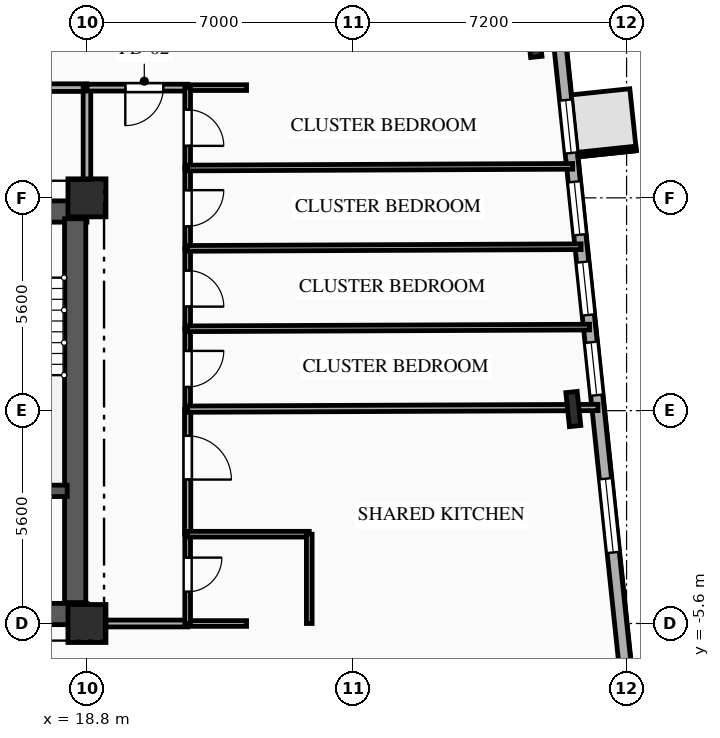
"""IFC4 building model, lengths in metres.
Left out: names, types, materials, properties, quantities, classifications, styles, units other than length and angle.
Written with IfcOpenShell. Run it as: python <this file> out.ifc"""

import sys

from ifc_helpers import new_model, si_unit, direction, frame, frame_2d, origin, origin_2d, place, context, subcontext, project, spatial, rectangle, i_section, extrude, element, fill, save


model = new_model("IFC4")
c1 = context("Model", 3, precision=1e-05, world=origin(), true_north=direction((0.0, 1.0)))
c2 = subcontext(c1, "Body", "Model", "MODEL_VIEW")
j1 = project(units=[si_unit("LENGTHUNIT", "METRE"), si_unit("PLANEANGLEUNIT", "RADIAN")], contexts=[c1])
p1 = place(None, origin())
s1 = spatial("IfcSite", under=j1, at=p1, CompositionType="ELEMENT")
p2 = place(p1, origin())
s2 = spatial("IfcBuilding", under=s1, at=p2, CompositionType="ELEMENT")
p3 = place(p2, frame((0.0, 0.0, 89.05)))
s3 = spatial("IfcBuildingStorey", under=s2, at=p3, CompositionType="ELEMENT", Elevation=89.05)
for number, where, z_axis, x_axis in (
    (1, (18.8, -5.6, 0.0), (0.0, 0.0, 1.0), (1.0, 0.0, 0.0)),
    (2, (18.8, 5.6, 0.0), (0.0, 0.0, 1.0), (1.0, 0.0, 0.0)),
):
    element("IfcColumn", number, at=place(p3, frame(where, z_axis=z_axis, x_axis=x_axis)), inside=s3, PredefinedType="COLUMN", context=c2, shape_type="SweptSolid", body=[
        extrude(rectangle(XDim=1.0, YDim=1.0, at=origin_2d()), origin(), (0.0, 0.0, 1.0), 3.35),
    ])
for number, where, z_axis, x_axis in (
    (3, (31.598, 0.043, 0.0), (0.0, 0.0, 1.0), (0.995, 0.105, 0.0)),
    (4, (30.577, 9.756, 0.0), (0.0, 0.0, 1.0), (0.995, 0.105, 0.0)),
):
    element("IfcColumn", number, at=place(p3, frame(where, z_axis=z_axis, x_axis=x_axis)), inside=s3, PredefinedType="COLUMN", context=c2, shape_type="SweptSolid", body=[
        extrude(i_section(OverallWidth=0.3, OverallDepth=0.9, WebThickness=0.019, FlangeThickness=0.035, FilletRadius=0.03, at=origin_2d()), origin(), (0.0, 0.0, 1.0), 3.35),
    ])
p4 = place(p3, frame((30.135, 20.183, 0.0), z_axis=(0.0, 0.0, 1.0), x_axis=(0.104525716865, -0.994522184023, 0.0)))
e5 = element("IfcWall", 5, at=p4, inside=s3, PredefinedType="SOLIDWALL", context=c2, shape_type="SweptSolid", body=[
    extrude(rectangle(XDim=30.6, YDim=0.32, at=frame_2d((15.3, 0.0))), origin(), (0.0, 0.0, 1.0), 3.045),
])
p5 = place(p4, frame((12.077, 0.0, 0.85)))
e6 = element("IfcOpeningElement", 6, at=p5, cuts=e5, PredefinedType="OPENING", context=c2, shape_type="SweptSolid", body=[
    extrude(rectangle(XDim=1.4, YDim=1.85, at=frame_2d((0.7, 0.925))), frame((0.0, 0.17, 0.0), z_axis=(0.0, -1.0, 0.0), x_axis=(1.0, 0.0, 0.0)), (0.0, 0.0, 1.0), 0.34),
])
p6 = place(p4, frame((14.24, 0.0, 0.85)))
e7 = element("IfcOpeningElement", 7, at=p6, cuts=e5, PredefinedType="OPENING", context=c2, shape_type="SweptSolid", body=[
    extrude(rectangle(XDim=1.4, YDim=1.85, at=frame_2d((0.7, 0.925))), frame((0.0, 0.17, 0.0), z_axis=(0.0, -1.0, 0.0), x_axis=(1.0, 0.0, 0.0)), (0.0, 0.0, 1.0), 0.34),
])
p7 = place(p4, frame((16.362, 0.0, 0.85)))
e8 = element("IfcOpeningElement", 8, at=p7, cuts=e5, PredefinedType="OPENING", context=c2, shape_type="SweptSolid", body=[
    extrude(rectangle(XDim=1.4, YDim=1.85, at=frame_2d((0.7, 0.925))), frame((0.0, 0.17, 0.0), z_axis=(0.0, -1.0, 0.0), x_axis=(1.0, 0.0, 0.0)), (0.0, 0.0, 1.0), 0.34),
])
p8 = place(p4, frame((18.485, 0.0, 0.85)))
e9 = element("IfcOpeningElement", 9, at=p8, cuts=e5, PredefinedType="OPENING", context=c2, shape_type="SweptSolid", body=[
    extrude(rectangle(XDim=1.4, YDim=1.85, at=frame_2d((0.7, 0.925))), frame((0.0, 0.17, 0.0), z_axis=(0.0, -1.0, 0.0), x_axis=(1.0, 0.0, 0.0)), (0.0, 0.0, 1.0), 0.34),
])
p9 = place(p4, frame((22.095, 0.0, 0.85)))
e10 = element("IfcOpeningElement", 10, at=p9, cuts=e5, PredefinedType="OPENING", context=c2, shape_type="SweptSolid", body=[
    extrude(rectangle(XDim=1.95, YDim=1.85, at=frame_2d((0.975, 0.925))), frame((0.0, 0.17, 0.0), z_axis=(0.0, -1.0, 0.0), x_axis=(1.0, 0.0, 0.0)), (0.0, 0.0, 1.0), 0.34),
])
p10 = place(p3, frame((9.2, 5.24, 0.0), z_axis=(0.0, 0.0, 1.0), x_axis=(1.0, 0.0, 0.0)))
e11 = element("IfcWall", 11, at=p10, inside=s3, PredefinedType="SHEAR", context=c2, shape_type="SweptSolid", body=[
    extrude(rectangle(XDim=9.6, YDim=0.56, at=frame_2d((4.8, 0.0))), origin(), (0.0, 0.0, 1.0), 3.045),
])
p11 = place(p10, frame((6.95, 0.0, 0.0)))
e12 = element("IfcOpeningElement", 12, at=p11, cuts=e11, PredefinedType="OPENING", context=c2, shape_type="SweptSolid", body=[
    extrude(rectangle(XDim=1.1, YDim=2.15, at=frame_2d((0.55, 1.075))), frame((0.0, 0.29, 0.0), z_axis=(0.0, -1.0, 0.0), x_axis=(1.0, 0.0, 0.0)), (0.0, 0.0, 1.0), 0.58),
])
p12 = place(p10, frame((3.775, 0.0, 0.0)))
e13 = element("IfcOpeningElement", 13, at=p12, cuts=e11, PredefinedType="OPENING", context=c2, shape_type="SweptSolid", body=[
    extrude(rectangle(XDim=1.05, YDim=2.1, at=frame_2d((0.525, 1.05))), frame((0.0, 0.29, 0.0), z_axis=(0.0, -1.0, 0.0), x_axis=(1.0, 0.0, 0.0)), (0.0, 0.0, 1.0), 0.58),
])
p13 = place(p3, frame((9.2, -5.35, 0.0), z_axis=(0.0, 0.0, 1.0), x_axis=(1.0, 0.0, 0.0)))
e14 = element("IfcWall", 14, at=p13, inside=s3, PredefinedType="SHEAR", context=c2, shape_type="SweptSolid", body=[
    extrude(rectangle(XDim=9.6, YDim=0.56, at=frame_2d((4.8, 0.0))), origin(), (0.0, 0.0, 1.0), 3.045),
])
p14 = place(p13, frame((7.65, 0.0, 0.0)))
e15 = element("IfcOpeningElement", 15, at=p14, cuts=e14, PredefinedType="OPENING", context=c2, shape_type="SweptSolid", body=[
    extrude(rectangle(XDim=0.9, YDim=2.1, at=frame_2d((0.45, 1.05))), frame((0.0, 0.29, 0.0), z_axis=(0.0, -1.0, 0.0), x_axis=(1.0, 0.0, 0.0)), (0.0, 0.0, 1.0), 0.58),
])
p15 = place(p3, frame((18.49, -5.05, 0.0), z_axis=(0.0, 0.0, 1.0), x_axis=(0.0, 1.0, 0.0)))
e16 = element("IfcWall", 16, at=p15, inside=s3, PredefinedType="SHEAR", context=c2, shape_type="SweptSolid", body=[
    extrude(rectangle(XDim=10.1, YDim=0.56, at=frame_2d((5.05, 0.0))), origin(), (0.0, 0.0, 1.0), 3.045),
])
p16 = place(p3, frame((15.1, -2.11, 0.0), z_axis=(0.0, 0.0, 1.0), x_axis=(1.0, 0.0, 0.0)))
e17 = element("IfcWall", 17, at=p16, inside=s3, PredefinedType="SHEAR", context=c2, shape_type="SweptSolid", body=[
    extrude(rectangle(XDim=3.18, YDim=0.3, at=frame_2d((1.59, 0.0))), origin(), (0.0, 0.0, 1.0), 3.045),
])
p17 = place(p3, frame((18.8, 8.5, 0.0), z_axis=(0.0, 0.0, 1.0), x_axis=(-1.0, 0.0, 0.0)))
e18 = element("IfcWall", 18, at=p17, inside=s3, PredefinedType="PARTITIONING", context=c2, shape_type="SweptSolid", body=[
    extrude(rectangle(XDim=6.8, YDim=0.2, at=frame_2d((3.4, 0.0))), origin(), (0.0, 0.0, 1.0), 3.045),
])
p18 = place(p17, frame((3.985, 0.0, 0.0)))
e19 = element("IfcOpeningElement", 19, at=p18, cuts=e18, PredefinedType="OPENING", context=c2, shape_type="SweptSolid", body=[
    extrude(rectangle(XDim=1.1, YDim=2.15, at=frame_2d((0.55, 1.075))), frame((0.0, 0.11, 0.0), z_axis=(0.0, -1.0, 0.0), x_axis=(1.0, 0.0, 0.0)), (0.0, 0.0, 1.0), 0.22),
])
p19 = place(p3, frame((18.8, 5.6, 0.0), z_axis=(0.0, 0.0, 1.0), x_axis=(0.0, 1.0, 0.0)))
e20 = element("IfcWall", 20, at=p19, inside=s3, PredefinedType="PARTITIONING", context=c2, shape_type="SweptSolid", body=[
    extrude(rectangle(XDim=2.9, YDim=0.2, at=frame_2d((1.45, 0.0))), origin(), (0.0, 0.0, 1.0), 2.53),
])
p20 = place(p3, frame((21.45, 8.5, 0.0), z_axis=(0.0, 0.0, 1.0), x_axis=(-1.0, 0.0, 0.0)))
e21 = element("IfcWall", 21, at=p20, inside=s3, PredefinedType="PARTITIONING", context=c2, shape_type="SweptSolid", body=[
    extrude(rectangle(XDim=2.65, YDim=0.18, at=frame_2d((1.325, 0.0))), origin(), (0.0, 0.0, 1.0), 3.045),
])
p21 = place(p20, frame((0.641, 0.0, 0.0)))
e22 = element("IfcOpeningElement", 22, at=p21, cuts=e21, PredefinedType="OPENING", context=c2, shape_type="SweptSolid", body=[
    extrude(rectangle(XDim=1.0, YDim=2.15, at=frame_2d((0.5, 1.075))), frame((0.0, 0.1, 0.0), z_axis=(0.0, -1.0, 0.0), x_axis=(1.0, 0.0, 0.0)), (0.0, 0.0, 1.0), 0.2),
])
p22 = place(p3, frame((23.0, 8.5, 0.0), z_axis=(0.0, 0.0, 1.0), x_axis=(-1.0, 0.0, 0.0)))
e23 = element("IfcWall", 23, at=p22, inside=s3, PredefinedType="PARTITIONING", context=c2, shape_type="SweptSolid", body=[
    extrude(rectangle(XDim=1.55, YDim=0.15, at=frame_2d((0.775, 0.0))), origin(), (0.0, 0.0, 1.0), 3.045),
])
p23 = place(p3, frame((18.8, -5.6, 0.0), z_axis=(0.0, 0.0, 1.0), x_axis=(1.0, 0.0, 0.0)))
e24 = element("IfcWall", 24, at=p23, inside=s3, PredefinedType="PARTITIONING", context=c2, shape_type="SweptSolid", body=[
    extrude(rectangle(XDim=2.65, YDim=0.18, at=frame_2d((1.325, 0.0))), origin(), (0.0, 0.0, 1.0), 2.53),
])
p24 = place(p3, frame((21.45, -5.6, 0.0), z_axis=(0.0, 0.0, 1.0), x_axis=(1.0, 0.0, 0.0)))
e25 = element("IfcWall", 25, at=p24, inside=s3, PredefinedType="PLUMBINGWALL", context=c2, shape_type="SweptSolid", body=[
    extrude(rectangle(XDim=1.55, YDim=0.15, at=frame_2d((0.775, 0.0))), origin(), (0.0, 0.0, 1.0), 3.045),
])
p25 = place(p3, frame((21.45, -3.25, 0.0), z_axis=(0.0, 0.0, 1.0), x_axis=(0.0, -1.0, 0.0)))
e26 = element("IfcWall", 26, at=p25, inside=s3, PredefinedType="PLUMBINGWALL", context=c2, shape_type="SweptSolid", body=[
    extrude(rectangle(XDim=2.35, YDim=0.15, at=frame_2d((1.175, 0.0))), origin(), (0.0, 0.0, 1.0), 3.045),
])
p26 = place(p25, frame((0.616, 0.0, 0.0)))
e27 = element("IfcOpeningElement", 27, at=p26, cuts=e26, PredefinedType="OPENING", context=c2, shape_type="SweptSolid", body=[
    extrude(rectangle(XDim=0.9, YDim=2.1, at=frame_2d((0.45, 1.05))), frame((0.0, 0.085, 0.0), z_axis=(0.0, -1.0, 0.0), x_axis=(1.0, 0.0, 0.0)), (0.0, 0.0, 1.0), 0.17),
])
p27 = place(p3, frame((21.45, 0.04, 0.0), z_axis=(0.0, 0.0, 1.0), x_axis=(0.0, -1.0, 0.0)))
e28 = element("IfcWall", 28, at=p27, inside=s3, PredefinedType="PARTITIONING", context=c2, shape_type="SweptSolid", body=[
    extrude(rectangle(XDim=3.29, YDim=0.165, at=frame_2d((1.645, 0.0))), origin(), (0.0, 0.0, 1.0), 3.045),
])
p28 = place(p27, frame((0.702, 0.0, 0.0)))
e29 = element("IfcOpeningElement", 29, at=p28, cuts=e28, PredefinedType="OPENING", context=c2, shape_type="SweptSolid", body=[
    extrude(rectangle(XDim=1.15, YDim=2.15, at=frame_2d((0.575, 1.075))), frame((0.0, 0.093, 0.0), z_axis=(0.0, -1.0, 0.0), x_axis=(1.0, 0.0, 0.0)), (0.0, 0.0, 1.0), 0.185),
])
p29 = place(p3, frame((21.45, 2.155, 0.0), z_axis=(0.0, 0.0, 1.0), x_axis=(0.0, -1.0, 0.0)))
e30 = element("IfcWall", 30, at=p29, inside=s3, PredefinedType="PARTITIONING", context=c2, shape_type="SweptSolid", body=[
    extrude(rectangle(XDim=2.115, YDim=0.15, at=frame_2d((1.058, 0.0))), origin(), (0.0, 0.0, 1.0), 3.045),
])
p30 = place(p29, frame((0.583, 0.0, 0.0)))
e31 = element("IfcOpeningElement", 31, at=p30, cuts=e30, PredefinedType="OPENING", context=c2, shape_type="SweptSolid", body=[
    extrude(rectangle(XDim=0.95, YDim=2.1, at=frame_2d((0.475, 1.05))), frame((0.0, 0.085, 0.0), z_axis=(0.0, -1.0, 0.0), x_axis=(1.0, 0.0, 0.0)), (0.0, 0.0, 1.0), 0.17),
])
p31 = place(p3, frame((21.45, 4.27, 0.0), z_axis=(0.0, 0.0, 1.0), x_axis=(0.0, -1.0, 0.0)))
e32 = element("IfcWall", 32, at=p31, inside=s3, PredefinedType="PARTITIONING", context=c2, shape_type="SweptSolid", body=[
    extrude(rectangle(XDim=2.115, YDim=0.15, at=frame_2d((1.058, 0.0))), origin(), (0.0, 0.0, 1.0), 3.045),
])
p32 = place(p31, frame((0.583, 0.0, 0.0)))
e33 = element("IfcOpeningElement", 33, at=p32, cuts=e32, PredefinedType="OPENING", context=c2, shape_type="SweptSolid", body=[
    extrude(rectangle(XDim=0.95, YDim=2.1, at=frame_2d((0.475, 1.05))), frame((0.0, 0.085, 0.0), z_axis=(0.0, -1.0, 0.0), x_axis=(1.0, 0.0, 0.0)), (0.0, 0.0, 1.0), 0.17),
])
p33 = place(p3, frame((21.45, 6.385, 0.0), z_axis=(0.0, 0.0, 1.0), x_axis=(0.0, -1.0, 0.0)))
e34 = element("IfcWall", 34, at=p33, inside=s3, PredefinedType="PARTITIONING", context=c2, shape_type="SweptSolid", body=[
    extrude(rectangle(XDim=2.115, YDim=0.15, at=frame_2d((1.058, 0.0))), origin(), (0.0, 0.0, 1.0), 3.045),
])
p34 = place(p33, frame((0.583, 0.0, 0.0)))
e35 = element("IfcOpeningElement", 35, at=p34, cuts=e34, PredefinedType="OPENING", context=c2, shape_type="SweptSolid", body=[
    extrude(rectangle(XDim=0.95, YDim=2.1, at=frame_2d((0.475, 1.05))), frame((0.0, 0.085, 0.0), z_axis=(0.0, -1.0, 0.0), x_axis=(1.0, 0.0, 0.0)), (0.0, 0.0, 1.0), 0.17),
])
p35 = place(p3, frame((21.45, 8.5, 0.0), z_axis=(0.0, 0.0, 1.0), x_axis=(0.0, -1.0, 0.0)))
e36 = element("IfcWall", 36, at=p35, inside=s3, PredefinedType="PARTITIONING", context=c2, shape_type="SweptSolid", body=[
    extrude(rectangle(XDim=2.115, YDim=0.15, at=frame_2d((1.058, 0.0))), origin(), (0.0, 0.0, 1.0), 3.045),
])
p36 = place(p35, frame((0.583, 0.0, 0.0)))
e37 = element("IfcOpeningElement", 37, at=p36, cuts=e36, PredefinedType="OPENING", context=c2, shape_type="SweptSolid", body=[
    extrude(rectangle(XDim=0.95, YDim=2.1, at=frame_2d((0.475, 1.05))), frame((0.0, 0.085, 0.0), z_axis=(0.0, -1.0, 0.0), x_axis=(1.0, 0.0, 0.0)), (0.0, 0.0, 1.0), 0.17),
])
p37 = place(p3, frame((21.45, -3.25, 0.0), z_axis=(0.0, 0.0, 1.0), x_axis=(1.0, 0.0, 0.0)))
e38 = element("IfcWall", 38, at=p37, inside=s3, PredefinedType="PLUMBINGWALL", context=c2, shape_type="SweptSolid", body=[
    extrude(rectangle(XDim=3.2, YDim=0.15, at=frame_2d((1.6, 0.0))), origin(), (0.0, 0.0, 1.0), 3.045),
])
p38 = place(p3, frame((24.65, -3.25, 0.0), z_axis=(0.0, 0.0, 1.0), x_axis=(0.0, -1.0, 0.0)))
e39 = element("IfcWall", 39, at=p38, inside=s3, PredefinedType="PLUMBINGWALL", context=c2, shape_type="SweptSolid", body=[
    extrude(rectangle(XDim=2.35, YDim=0.15, at=frame_2d((1.175, 0.0))), origin(), (0.0, 0.0, 1.0), 3.045),
])
p39 = place(p3, frame((21.45, 0.04, 0.0), z_axis=(0.0, 0.0, 1.0), x_axis=(0.999991717636, 0.004069970361, 0.0)))
e40 = element("IfcWall", 40, at=p39, inside=s3, PredefinedType="PARTITIONING", context=c2, shape_type="SweptSolid", body=[
    extrude(rectangle(XDim=10.797, YDim=0.165, at=frame_2d((5.399, 0.0))), origin(), (0.0, 0.0, 1.0), 2.53),
])
p40 = place(p3, frame((21.45, 2.155, 0.0), z_axis=(0.0, 0.0, 1.0), x_axis=(0.999991365588, 0.004155568413, 0.0)))
e41 = element("IfcWall", 41, at=p40, inside=s3, PredefinedType="PARTITIONING", context=c2, shape_type="SweptSolid", body=[
    extrude(rectangle(XDim=10.575, YDim=0.15, at=frame_2d((5.288, 0.0))), origin(), (0.0, 0.0, 1.0), 3.045),
])
p41 = place(p3, frame((21.45, 4.27, 0.0), z_axis=(0.0, 0.0, 1.0), x_axis=(0.999990991033, 0.004244744214, 0.0)))
e42 = element("IfcWall", 42, at=p41, inside=s3, PredefinedType="PARTITIONING", context=c2, shape_type="SweptSolid", body=[
    extrude(rectangle(XDim=10.353, YDim=0.15, at=frame_2d((5.176, 0.0))), origin(), (0.0, 0.0, 1.0), 3.045),
])
p42 = place(p3, frame((21.45, 6.385, 0.0), z_axis=(0.0, 0.0, 1.0), x_axis=(0.999990591112, 0.004337935759, 0.0)))
e43 = element("IfcWall", 43, at=p42, inside=s3, PredefinedType="PARTITIONING", context=c2, shape_type="SweptSolid", body=[
    extrude(rectangle(XDim=10.13, YDim=0.15, at=frame_2d((5.065, 0.0))), origin(), (0.0, 0.0, 1.0), 3.045),
])
p43 = place(p5, origin())
e44 = element("IfcWindow", 44, at=p43, inside=s3, PartitioningType="SINGLE_PANEL", PredefinedType="WINDOW", context=c2, shape_type="SweptSolid", body=[
    extrude(rectangle(XDim=1.4, YDim=1.85, at=frame_2d((0.7, 0.925))), frame((0.0, 0.03, 0.0), z_axis=(0.0, -1.0, 0.0), x_axis=(1.0, 0.0, 0.0)), (0.0, 0.0, 1.0), 0.06),
])
fill(e6, e44)
p44 = place(p6, origin())
e45 = element("IfcWindow", 45, at=p44, inside=s3, PartitioningType="SINGLE_PANEL", PredefinedType="WINDOW", context=c2, shape_type="SweptSolid", body=[
    extrude(rectangle(XDim=1.4, YDim=1.85, at=frame_2d((0.7, 0.925))), frame((0.0, 0.03, 0.0), z_axis=(0.0, -1.0, 0.0), x_axis=(1.0, 0.0, 0.0)), (0.0, 0.0, 1.0), 0.06),
])
fill(e7, e45)
p45 = place(p7, origin())
e46 = element("IfcWindow", 46, at=p45, inside=s3, PartitioningType="SINGLE_PANEL", PredefinedType="WINDOW", context=c2, shape_type="SweptSolid", body=[
    extrude(rectangle(XDim=1.4, YDim=1.85, at=frame_2d((0.7, 0.925))), frame((0.0, 0.03, 0.0), z_axis=(0.0, -1.0, 0.0), x_axis=(1.0, 0.0, 0.0)), (0.0, 0.0, 1.0), 0.06),
])
fill(e8, e46)
p46 = place(p8, origin())
e47 = element("IfcWindow", 47, at=p46, inside=s3, PartitioningType="SINGLE_PANEL", PredefinedType="WINDOW", context=c2, shape_type="SweptSolid", body=[
    extrude(rectangle(XDim=1.4, YDim=1.85, at=frame_2d((0.7, 0.925))), frame((0.0, 0.03, 0.0), z_axis=(0.0, -1.0, 0.0), x_axis=(1.0, 0.0, 0.0)), (0.0, 0.0, 1.0), 0.06),
])
fill(e9, e47)
p47 = place(p9, origin())
e48 = element("IfcWindow", 48, at=p47, inside=s3, PartitioningType="SINGLE_PANEL", PredefinedType="WINDOW", context=c2, shape_type="SweptSolid", body=[
    extrude(rectangle(XDim=1.95, YDim=1.85, at=frame_2d((0.975, 0.925))), frame((0.0, 0.03, 0.0), z_axis=(0.0, -1.0, 0.0), x_axis=(1.0, 0.0, 0.0)), (0.0, 0.0, 1.0), 0.06),
])
fill(e10, e48)
p48 = place(p21, origin())
e49 = element("IfcDoor", 49, at=p48, inside=s3, OperationType="SINGLE_SWING_RIGHT", PredefinedType="DOOR", context=c2, shape_type="SweptSolid", body=[
    extrude(rectangle(XDim=1.0, YDim=2.15, at=frame_2d((0.5, 1.075))), frame((0.0, 0.025, 0.0), z_axis=(0.0, -1.0, 0.0), x_axis=(1.0, 0.0, 0.0)), (0.0, 0.0, 1.0), 0.05),
])
fill(e22, e49)
p49 = place(p26, origin())
e50 = element("IfcDoor", 50, at=p49, inside=s3, OperationType="SINGLE_SWING_LEFT", PredefinedType="DOOR", context=c2, shape_type="SweptSolid", body=[
    extrude(rectangle(XDim=0.9, YDim=2.1, at=frame_2d((0.45, 1.05))), frame((0.0, 0.025, 0.0), z_axis=(0.0, -1.0, 0.0), x_axis=(1.0, 0.0, 0.0)), (0.0, 0.0, 1.0), 0.05),
])
fill(e27, e50)
p50 = place(p28, origin())
e51 = element("IfcDoor", 51, at=p50, inside=s3, OperationType="SINGLE_SWING_RIGHT", PredefinedType="DOOR", context=c2, shape_type="SweptSolid", body=[
    extrude(rectangle(XDim=1.15, YDim=2.15, at=frame_2d((0.575, 1.075))), frame((0.0, 0.025, 0.0), z_axis=(0.0, -1.0, 0.0), x_axis=(1.0, 0.0, 0.0)), (0.0, 0.0, 1.0), 0.05),
])
fill(e29, e51)
p51 = place(p30, origin())
e52 = element("IfcDoor", 52, at=p51, inside=s3, OperationType="SINGLE_SWING_LEFT", PredefinedType="DOOR", context=c2, shape_type="SweptSolid", body=[
    extrude(rectangle(XDim=0.95, YDim=2.1, at=frame_2d((0.475, 1.05))), frame((0.0, 0.025, 0.0), z_axis=(0.0, -1.0, 0.0), x_axis=(1.0, 0.0, 0.0)), (0.0, 0.0, 1.0), 0.05),
])
fill(e31, e52)
p52 = place(p32, origin())
e53 = element("IfcDoor", 53, at=p52, inside=s3, OperationType="SINGLE_SWING_RIGHT", PredefinedType="DOOR", context=c2, shape_type="SweptSolid", body=[
    extrude(rectangle(XDim=0.95, YDim=2.1, at=frame_2d((0.475, 1.05))), frame((0.0, 0.025, 0.0), z_axis=(0.0, -1.0, 0.0), x_axis=(1.0, 0.0, 0.0)), (0.0, 0.0, 1.0), 0.05),
])
fill(e33, e53)
p53 = place(p34, origin())
e54 = element("IfcDoor", 54, at=p53, inside=s3, OperationType="SINGLE_SWING_LEFT", PredefinedType="DOOR", context=c2, shape_type="SweptSolid", body=[
    extrude(rectangle(XDim=0.95, YDim=2.1, at=frame_2d((0.475, 1.05))), frame((0.0, 0.025, 0.0), z_axis=(0.0, -1.0, 0.0), x_axis=(1.0, 0.0, 0.0)), (0.0, 0.0, 1.0), 0.05),
])
fill(e35, e54)
p54 = place(p36, origin())
e55 = element("IfcDoor", 55, at=p54, inside=s3, OperationType="SINGLE_SWING_RIGHT", PredefinedType="DOOR", context=c2, shape_type="SweptSolid", body=[
    extrude(rectangle(XDim=0.95, YDim=2.1, at=frame_2d((0.475, 1.05))), frame((0.0, 0.025, 0.0), z_axis=(0.0, -1.0, 0.0), x_axis=(1.0, 0.0, 0.0)), (0.0, 0.0, 1.0), 0.05),
])
fill(e37, e55)
save(model, sys.argv[1])
